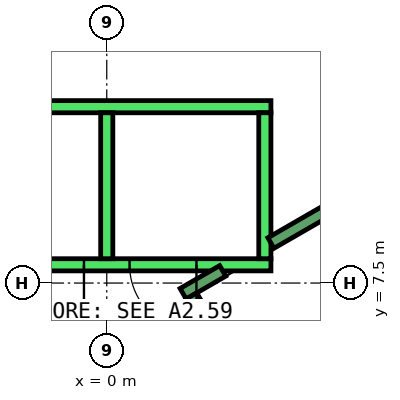
"""IFC4 building model, lengths in metres.
Left out: names, types, materials, properties, quantities, classifications, styles, units other than length and angle.
Written with IfcOpenShell. Run it as: python <this file> out.ifc"""

import sys

from ifc_helpers import new_model, si_unit, direction, frame, frame_2d, origin, place, context, subcontext, project, spatial, rectangle, extrude, element, fill, save


model = new_model("IFC4")
c1 = context("Model", 3, precision=1e-05, world=origin(), true_north=direction((0.0, 1.0)))
c2 = subcontext(c1, "Body", "Model", "MODEL_VIEW")
j1 = project(units=[si_unit("LENGTHUNIT", "METRE"), si_unit("PLANEANGLEUNIT", "RADIAN")], contexts=[c1])
p1 = place(None, origin())
s1 = spatial("IfcSite", under=j1, at=p1, CompositionType="ELEMENT")
p2 = place(p1, origin())
s2 = spatial("IfcBuilding", under=s1, at=p2, CompositionType="ELEMENT")
p3 = place(p2, frame((0.0, 0.0, 277.4)))
s3 = spatial("IfcBuildingStorey", under=s2, at=p3, CompositionType="ELEMENT", Elevation=277.4)
p4 = place(p3, frame((2.7, 7.8, 0.0), z_axis=(0.0, 0.0, 1.0), x_axis=(-1.0, 0.0, 0.0)))
e1 = element("IfcWall", 1, at=p4, inside=s3, PredefinedType="STANDARD", context=c2, shape_type="SweptSolid", body=[
    extrude(rectangle(XDim=5.4, YDim=0.2, at=frame_2d((2.7, 0.0))), origin(), (0.0, 0.0, 1.0), 3.0),
])
p5 = place(p4, frame((1.225, 0.0, 0.0)))
e2 = element("IfcOpeningElement", 2, at=p5, cuts=e1, PredefinedType="OPENING", context=c2, shape_type="SweptSolid", body=[
    extrude(rectangle(XDim=1.1, YDim=2.1, at=frame_2d((0.55, 1.05))), frame((0.0, 0.11, 0.0), z_axis=(0.0, -1.0, 0.0), x_axis=(1.0, 0.0, 0.0)), (0.0, 0.0, 1.0), 0.22),
])
p6 = place(p4, frame((3.075, 0.0, 0.0)))
e3 = element("IfcOpeningElement", 3, at=p6, cuts=e1, PredefinedType="OPENING", context=c2, shape_type="SweptSolid", body=[
    extrude(rectangle(XDim=1.1, YDim=2.1, at=frame_2d((0.55, 1.05))), frame((0.0, 0.11, 0.0), z_axis=(0.0, -1.0, 0.0), x_axis=(1.0, 0.0, 0.0)), (0.0, 0.0, 1.0), 0.22),
])
p7 = place(p3, frame((2.7, 10.4, 0.0), z_axis=(0.0, 0.0, 1.0), x_axis=(-1.0, 0.0, 0.0)))
e4 = element("IfcWall", 4, at=p7, inside=s3, PredefinedType="STANDARD", context=c2, shape_type="SweptSolid", body=[
    extrude(rectangle(XDim=5.4, YDim=0.2, at=frame_2d((2.7, 0.0))), origin(), (0.0, 0.0, 1.0), 3.0),
])
for number, where, z_axis, x_axis in (
    (5, (2.6, 7.9, 0.0), (0.0, 0.0, 1.0), (0.0, 1.0, 0.0)),
    (6, (0.0, 7.9, 0.0), (0.0, 0.0, 1.0), (0.0, 1.0, 0.0)),
):
    element("IfcWall", number, at=place(p3, frame(where, z_axis=z_axis, x_axis=x_axis)), inside=s3, PredefinedType="STANDARD", context=c2, shape_type="SweptSolid", body=[
        extrude(rectangle(XDim=2.4, YDim=0.2, at=frame_2d((1.2, 0.0))), origin(), (0.0, 0.0, 1.0), 3.0),
    ])
p8 = place(p3, frame((2.7, 8.158, 0.0), z_axis=(0.0, 0.0, 1.0), x_axis=(0.86611865017, 0.499838457731, 0.0)))
e7 = element("IfcWall", 7, at=p8, inside=s3, PredefinedType="STANDARD", context=c2, shape_type="SweptSolid", body=[
    extrude(rectangle(XDim=2.733, YDim=0.2, at=frame_2d((1.366, 0.0))), origin(), (0.0, 0.0, 1.0), 3.0),
])
p9 = place(p3, frame((1.256, 7.324, 0.0), z_axis=(0.0, 0.0, 1.0), x_axis=(0.865915093549, 0.500191014278, 0.0)))
e8 = element("IfcWall", 8, at=p9, inside=s3, PredefinedType="STANDARD", context=c2, shape_type="SweptSolid", body=[
    extrude(rectangle(XDim=0.752, YDim=0.2, at=frame_2d((0.376, 0.0))), origin(), (0.0, 0.0, 1.0), 3.0),
])
p10 = place(p3, frame((4.843, 1.312, 0.0), z_axis=(0.0, 0.0, 1.0), x_axis=(-0.499963383562, 0.866046543262, 0.0)))
e9 = element("IfcWall", 9, at=p10, inside=s3, PredefinedType="STANDARD", context=c2, shape_type="SweptSolid", body=[
    extrude(rectangle(XDim=6.9, YDim=0.2, at=frame_2d((3.45, 0.0))), origin(), (0.0, 0.0, 1.0), 3.0),
])
p11 = place(p10, frame((0.45, 0.0, 0.0)))
e10 = element("IfcOpeningElement", 10, at=p11, cuts=e9, PredefinedType="OPENING", context=c2, shape_type="SweptSolid", body=[
    extrude(rectangle(XDim=1.1, YDim=2.2, at=frame_2d((0.55, 1.1))), frame((0.0, 0.11, 0.0), z_axis=(0.0, -1.0, 0.0), x_axis=(1.0, 0.0, 0.0)), (0.0, 0.0, 1.0), 0.22),
])
p12 = place(p5, origin())
e11 = element("IfcDoor", 11, at=p12, inside=s3, OperationType="SLIDING_TO_LEFT", PredefinedType="DOOR", context=c2, shape_type="SweptSolid", body=[
    extrude(rectangle(XDim=1.1, YDim=2.1, at=frame_2d((0.55, 1.05))), frame((0.0, 0.025, 0.0), z_axis=(0.0, -1.0, 0.0), x_axis=(1.0, 0.0, 0.0)), (0.0, 0.0, 1.0), 0.05),
])
fill(e2, e11)
p13 = place(p6, origin())
e12 = element("IfcDoor", 12, at=p13, inside=s3, OperationType="SLIDING_TO_LEFT", PredefinedType="DOOR", context=c2, shape_type="SweptSolid", body=[
    extrude(rectangle(XDim=1.1, YDim=2.1, at=frame_2d((0.55, 1.05))), frame((0.0, 0.025, 0.0), z_axis=(0.0, -1.0, 0.0), x_axis=(1.0, 0.0, 0.0)), (0.0, 0.0, 1.0), 0.05),
])
fill(e3, e12)
save(model, sys.argv[1])
